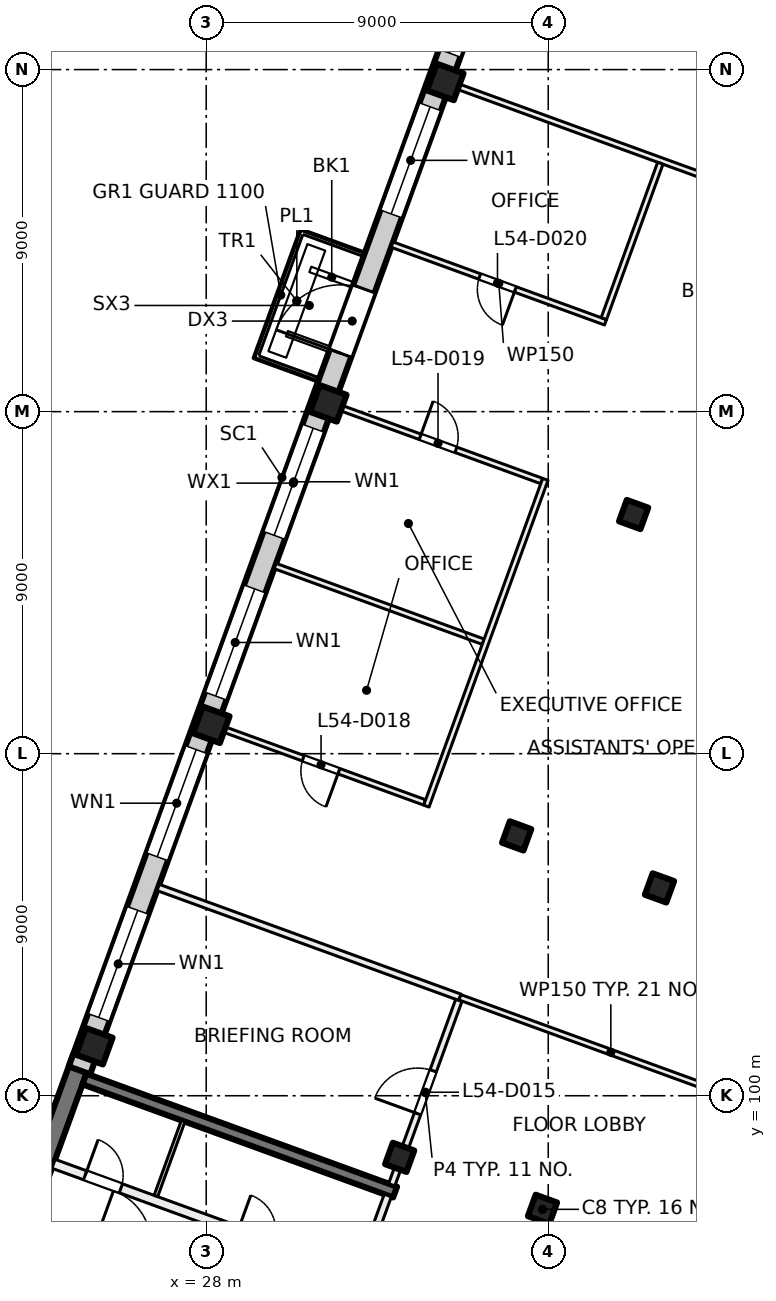
"""IFC4 building model, lengths in metres.
Left out: names, types, materials, properties, quantities, classifications, styles, units other than length and angle.
Written with IfcOpenShell. Run it as: python <this file> out.ifc"""

import sys

from ifc_helpers import new_model, si_unit, direction, frame, frame_2d, origin, origin_2d, place, context, subcontext, project, spatial, rectangle, extrude, element, fill, save


model = new_model("IFC4")
c1 = context("Model", 3, precision=1e-05, world=origin(), true_north=direction((0.0, 1.0)))
c2 = subcontext(c1, "Body", "Model", "MODEL_VIEW")
j1 = project(units=[si_unit("LENGTHUNIT", "METRE"), si_unit("PLANEANGLEUNIT", "RADIAN")], contexts=[c1])
p1 = place(None, origin())
s1 = spatial("IfcSite", under=j1, at=p1, CompositionType="ELEMENT")
p2 = place(p1, origin())
s2 = spatial("IfcBuilding", under=s1, at=p2, CompositionType="ELEMENT")
p3 = place(p2, frame((0.0, 0.0, 228.0)))
s3 = spatial("IfcBuildingStorey", under=s2, at=p3, CompositionType="ELEMENT", Elevation=228.0)
for number, where, z_axis, x_axis in (
    (1, (39.927, 105.468, 0.0), (0.0, 0.0, 1.0), (-0.342, -0.94, 0.0)),
    (2, (36.849, 97.011, 0.0), (0.0, 0.0, 1.0), (-0.342, -0.94, 0.0)),
    (3, (39.247, 115.293, 0.0), (0.0, 0.0, 1.0), (-0.342, -0.94, 0.0)),
    (4, (36.169, 106.836, 0.0), (0.0, 0.0, 1.0), (-0.342, -0.94, 0.0)),
    (5, (33.091, 98.379, 0.0), (0.0, 0.0, 1.0), (-0.342, -0.94, 0.0)),
):
    element("IfcColumn", number, at=place(p3, frame(where, z_axis=z_axis, x_axis=x_axis)), inside=s3, PredefinedType="COLUMN", context=c2, shape_type="SweptSolid", body=[
        extrude(rectangle(XDim=0.6, YDim=0.6, at=origin_2d()), origin(), (0.0, 0.0, 1.0), 4.0),
    ])
for number, where, z_axis, x_axis in (
    (6, (34.291, 126.675, 0.0), (0.0, 0.0, 1.0), (-0.342, -0.94, 0.0)),
    (7, (31.212, 118.218, 0.0), (0.0, 0.0, 1.0), (-0.342, -0.94, 0.0)),
    (8, (28.134, 109.76, 0.0), (0.0, 0.0, 1.0), (-0.342, -0.94, 0.0)),
    (9, (25.056, 101.303, 0.0), (0.0, 0.0, 1.0), (-0.342, -0.94, 0.0)),
):
    element("IfcColumn", number, at=place(p3, frame(where, z_axis=z_axis, x_axis=x_axis)), inside=s3, PredefinedType="COLUMN", context=c2, shape_type="SweptSolid", body=[
        extrude(rectangle(XDim=0.75, YDim=0.75, at=origin_2d()), origin(), (0.0, 0.0, 1.0), 4.0),
    ])
p4 = place(p3, frame((21.67, 92.585, 0.0), z_axis=(0.0, 0.0, 1.0), x_axis=(0.342035714298, 0.93968695327, 0.0)))
e10 = element("IfcWall", 10, at=p4, inside=s3, PredefinedType="SHEAR", context=c2, shape_type="SweptSolid", body=[
    extrude(rectangle(XDim=8.975, YDim=0.5, at=frame_2d((4.488, 0.0))), origin(), (0.0, 0.0, 1.0), 4.0),
])
p5 = place(p3, frame((32.971, 97.465, 0.0), z_axis=(0.0, 0.0, 1.0), x_axis=(-0.939695066972, 0.34201342241, 0.0)))
e11 = element("IfcWall", 11, at=p5, inside=s3, PredefinedType="SHEAR", context=c2, shape_type="SweptSolid", body=[
    extrude(rectangle(XDim=8.7, YDim=0.3, at=frame_2d((4.35, 0.0))), origin(), (0.0, 0.0, 1.0), 4.0),
])
p6 = place(p3, frame((24.666, 100.669, 0.0), z_axis=(0.0, 0.0, 1.0), x_axis=(0.34201964167, 0.939692803373, 0.0)))
e12 = element("IfcWall", 12, at=p6, inside=s3, PredefinedType="SOLIDWALL", context=c2, shape_type="SweptSolid", body=[
    extrude(rectangle(XDim=32.884, YDim=0.6, at=frame_2d((16.442, 0.0))), origin(), (0.0, 0.0, 1.0), 3.625),
])
p7 = place(p6, frame((1.48, 0.0, 0.9)))
e13 = element("IfcOpeningElement", 13, at=p7, cuts=e12, PredefinedType="OPENING", context=c2, shape_type="SweptSolid", body=[
    extrude(rectangle(XDim=3.0, YDim=2.4, at=frame_2d((1.5, 1.2))), frame((0.0, 0.31, 0.0), z_axis=(0.0, -1.0, 0.0), x_axis=(1.0, 0.0, 0.0)), (0.0, 0.0, 1.0), 0.62),
])
p8 = place(p6, frame((5.98, 0.0, 0.9)))
e14 = element("IfcOpeningElement", 14, at=p8, cuts=e12, PredefinedType="OPENING", context=c2, shape_type="SweptSolid", body=[
    extrude(rectangle(XDim=3.0, YDim=2.4, at=frame_2d((1.5, 1.2))), frame((0.0, 0.31, 0.0), z_axis=(0.0, -1.0, 0.0), x_axis=(1.0, 0.0, 0.0)), (0.0, 0.0, 1.0), 0.62),
])
p9 = place(p6, frame((10.48, 0.0, 0.9)))
e15 = element("IfcOpeningElement", 15, at=p9, cuts=e12, PredefinedType="OPENING", context=c2, shape_type="SweptSolid", body=[
    extrude(rectangle(XDim=3.0, YDim=2.4, at=frame_2d((1.5, 1.2))), frame((0.0, 0.31, 0.0), z_axis=(0.0, -1.0, 0.0), x_axis=(1.0, 0.0, 0.0)), (0.0, 0.0, 1.0), 0.62),
])
p10 = place(p6, frame((14.98, 0.0, 0.9)))
e16 = element("IfcOpeningElement", 16, at=p10, cuts=e12, PredefinedType="OPENING", context=c2, shape_type="SweptSolid", body=[
    extrude(rectangle(XDim=3.0, YDim=2.4, at=frame_2d((1.5, 1.2))), frame((0.0, 0.31, 0.0), z_axis=(0.0, -1.0, 0.0), x_axis=(1.0, 0.0, 0.0)), (0.0, 0.0, 1.0), 0.62),
])
p11 = place(p6, frame((20.08, 0.0, 0.0)))
e17 = element("IfcOpeningElement", 17, at=p11, cuts=e12, PredefinedType="OPENING", context=c2, shape_type="SweptSolid", body=[
    extrude(rectangle(XDim=1.8, YDim=2.4, at=frame_2d((0.9, 1.2))), frame((0.0, 0.31, 0.0), z_axis=(0.0, -1.0, 0.0), x_axis=(1.0, 0.0, 0.0)), (0.0, 0.0, 1.0), 0.62),
])
p12 = place(p6, frame((23.98, 0.0, 0.9)))
e18 = element("IfcOpeningElement", 18, at=p12, cuts=e12, PredefinedType="OPENING", context=c2, shape_type="SweptSolid", body=[
    extrude(rectangle(XDim=3.0, YDim=2.4, at=frame_2d((1.5, 1.2))), frame((0.0, 0.31, 0.0), z_axis=(0.0, -1.0, 0.0), x_axis=(1.0, 0.0, 0.0)), (0.0, 0.0, 1.0), 0.62),
])
p13 = place(p6, frame((28.48, 0.0, 0.9)))
e19 = element("IfcOpeningElement", 19, at=p13, cuts=e12, PredefinedType="OPENING", context=c2, shape_type="SweptSolid", body=[
    extrude(rectangle(XDim=3.0, YDim=2.4, at=frame_2d((1.5, 1.2))), frame((0.0, 0.31, 0.0), z_axis=(0.0, -1.0, 0.0), x_axis=(1.0, 0.0, 0.0)), (0.0, 0.0, 1.0), 0.62),
])
p14 = place(p3, frame((31.427, 93.663, 0.0), z_axis=(0.0, 0.0, 1.0), x_axis=(0.342030870568, 0.93968871632, 0.0)))
e20 = element("IfcWall", 20, at=p14, inside=s3, PredefinedType="PARTITIONING", context=c2, shape_type="SweptSolid", body=[
    extrude(rectangle(XDim=3.95, YDim=0.2, at=frame_2d((1.975, 0.0))), origin(), (0.0, 0.0, 1.0), 3.625),
])
p15 = place(p14, frame((0.3, 0.0, 0.0)))
e21 = element("IfcOpeningElement", 21, at=p15, cuts=e20, PredefinedType="OPENING", context=c2, shape_type="SweptSolid", body=[
    extrude(rectangle(XDim=1.2, YDim=2.1, at=frame_2d((0.6, 1.05))), frame((0.0, 0.11, 0.0), z_axis=(0.0, -1.0, 0.0), x_axis=(1.0, 0.0, 0.0)), (0.0, 0.0, 1.0), 0.22),
])
p16 = place(p3, frame((23.427, 96.682, 0.0), z_axis=(0.0, 0.0, 1.0), x_axis=(0.939690465531, -0.342026064782, 0.0)))
e22 = element("IfcWall", 22, at=p16, inside=s3, PredefinedType="PARTITIONING", context=c2, shape_type="SweptSolid", body=[
    extrude(rectangle(XDim=8.45, YDim=0.2, at=frame_2d((4.225, 0.0))), origin(), (0.0, 0.0, 1.0), 3.625),
])
p17 = place(p16, frame((1.725, 0.0, 0.0)))
e23 = element("IfcOpeningElement", 23, at=p17, cuts=e22, PredefinedType="OPENING", context=c2, shape_type="SweptSolid", body=[
    extrude(rectangle(XDim=1.5, YDim=2.1, at=frame_2d((0.75, 1.05))), frame((0.0, 0.11, 0.0), z_axis=(0.0, -1.0, 0.0), x_axis=(1.0, 0.0, 0.0)), (0.0, 0.0, 1.0), 0.22),
])
p18 = place(p3, frame((23.983, 98.208, 0.0), z_axis=(0.0, 0.0, 1.0), x_axis=(0.939699751196, -0.342000552051, 0.0)))
e24 = element("IfcWall", 24, at=p18, inside=s3, PredefinedType="PARTITIONING", context=c2, shape_type="SweptSolid", body=[
    extrude(rectangle(XDim=8.45, YDim=0.25, at=frame_2d((4.225, 0.0))), origin(), (0.0, 0.0, 1.0), 3.625),
])
p19 = place(p18, frame((5.16, 0.0, 0.0)))
e25 = element("IfcOpeningElement", 25, at=p19, cuts=e24, PredefinedType="OPENING", context=c2, shape_type="SweptSolid", body=[
    extrude(rectangle(XDim=1.0, YDim=2.1, at=frame_2d((0.5, 1.05))), frame((0.0, 0.135, 0.0), z_axis=(0.0, -1.0, 0.0), x_axis=(1.0, 0.0, 0.0)), (0.0, 0.0, 1.0), 0.27),
])
p20 = place(p18, frame((0.885, 0.0, 0.0)))
e26 = element("IfcOpeningElement", 26, at=p20, cuts=e24, PredefinedType="OPENING", context=c2, shape_type="SweptSolid", body=[
    extrude(rectangle(XDim=1.0, YDim=2.1, at=frame_2d((0.5, 1.05))), frame((0.0, 0.135, 0.0), z_axis=(0.0, -1.0, 0.0), x_axis=(1.0, 0.0, 0.0)), (0.0, 0.0, 1.0), 0.27),
])
p21 = place(p3, frame((26.676, 97.362, 0.0), z_axis=(0.0, 0.0, 1.0), x_axis=(0.342023078919, 0.939691552312, 0.0)))
e27 = element("IfcWall", 27, at=p21, inside=s3, PredefinedType="PARTITIONING", context=c2, shape_type="SweptSolid", body=[
    extrude(rectangle(XDim=2.1, YDim=0.1, at=frame_2d((1.05, 0.0))), origin(), (0.0, 0.0, 1.0), 3.625),
])
p22 = place(p3, frame((26.736, 105.48, 0.0), z_axis=(0.0, 0.0, 1.0), x_axis=(0.939706509432, -0.341981982173, 0.0)))
e28 = element("IfcWall", 28, at=p22, inside=s3, PredefinedType="PARTITIONING", context=c2, shape_type="SweptSolid", body=[
    extrude(rectangle(XDim=8.45, YDim=0.175, at=frame_2d((4.225, 0.0))), origin(), (0.0, 0.0, 1.0), 3.625),
])
p23 = place(p3, frame((29.814, 113.938, 0.0), z_axis=(0.0, 0.0, 1.0), x_axis=(0.939738354986, -0.341894463495, 0.0)))
e29 = element("IfcWall", 29, at=p23, inside=s3, PredefinedType="PARTITIONING", context=c2, shape_type="SweptSolid", body=[
    extrude(rectangle(XDim=5.826, YDim=0.15, at=frame_2d((2.913, 0.0))), origin(), (0.0, 0.0, 1.0), 3.625),
])
p24 = place(p3, frame((31.353, 118.166, 0.0), z_axis=(0.0, 0.0, 1.0), x_axis=(0.939733456466, -0.341907927371, 0.0)))
e30 = element("IfcWall", 30, at=p24, inside=s3, PredefinedType="PARTITIONING", context=c2, shape_type="SweptSolid", body=[
    extrude(rectangle(XDim=5.826, YDim=0.15, at=frame_2d((2.913, 0.0))), origin(), (0.0, 0.0, 1.0), 3.625),
])
p25 = place(p24, frame((2.423, 0.0, 0.0)))
e31 = element("IfcOpeningElement", 31, at=p25, cuts=e30, PredefinedType="OPENING", context=c2, shape_type="SweptSolid", body=[
    extrude(rectangle(XDim=1.0, YDim=2.1, at=frame_2d((0.5, 1.05))), frame((0.0, 0.085, 0.0), z_axis=(0.0, -1.0, 0.0), x_axis=(1.0, 0.0, 0.0)), (0.0, 0.0, 1.0), 0.17),
])
p26 = place(p3, frame((33.749, 107.717, 0.0), z_axis=(0.0, 0.0, 1.0), x_axis=(-0.939718757431, 0.341948324943, 0.0)))
e32 = element("IfcWall", 32, at=p26, inside=s3, PredefinedType="PARTITIONING", context=c2, shape_type="SweptSolid", body=[
    extrude(rectangle(XDim=5.825, YDim=0.15, at=frame_2d((2.913, 0.0))), origin(), (0.0, 0.0, 1.0), 3.625),
])
p27 = place(p26, frame((2.403, 0.0, 0.0)))
e33 = element("IfcOpeningElement", 33, at=p27, cuts=e32, PredefinedType="OPENING", context=c2, shape_type="SweptSolid", body=[
    extrude(rectangle(XDim=1.0, YDim=2.1, at=frame_2d((0.5, 1.05))), frame((0.0, 0.085, 0.0), z_axis=(0.0, -1.0, 0.0), x_axis=(1.0, 0.0, 0.0)), (0.0, 0.0, 1.0), 0.17),
])
p28 = place(p3, frame((36.924, 116.218, 0.0), z_axis=(0.0, 0.0, 1.0), x_axis=(-0.342220796767, -0.939619564643, 0.0)))
e34 = element("IfcWall", 34, at=p28, inside=s3, PredefinedType="PARTITIONING", context=c2, shape_type="SweptSolid", body=[
    extrude(rectangle(XDim=9.149, YDim=0.15, at=frame_2d((4.575, 0.0))), origin(), (0.0, 0.0, 1.0), 3.625),
])
p29 = place(p3, frame((34.431, 126.624, 0.0), z_axis=(0.0, 0.0, 1.0), x_axis=(0.939703144457, -0.341991228392, 0.0)))
e35 = element("IfcWall", 35, at=p29, inside=s3, PredefinedType="PARTITIONING", context=c2, shape_type="SweptSolid", body=[
    extrude(rectangle(XDim=12.401, YDim=0.15, at=frame_2d((6.2, 0.0))), origin(), (0.0, 0.0, 1.0), 3.625),
])
p30 = place(p3, frame((32.881, 97.657, 0.0), z_axis=(0.0, 0.0, 1.0), x_axis=(0.342058204353, 0.939678766832, 0.0)))
e36 = element("IfcWall", 36, at=p30, inside=s3, PredefinedType="PARTITIONING", context=c2, shape_type="SweptSolid", body=[
    extrude(rectangle(XDim=5.163, YDim=0.175, at=frame_2d((2.581, 0.0))), origin(), (0.0, 0.0, 1.0), 3.625),
])
p31 = place(p30, frame((1.991, 0.0, 0.0)))
e37 = element("IfcOpeningElement", 37, at=p31, cuts=e36, PredefinedType="OPENING", context=c2, shape_type="SweptSolid", body=[
    extrude(rectangle(XDim=1.2, YDim=2.1, at=frame_2d((0.6, 1.05))), frame((0.0, 0.097, 0.0), z_axis=(0.0, -1.0, 0.0), x_axis=(1.0, 0.0, 0.0)), (0.0, 0.0, 1.0), 0.195),
])
p32 = place(p3, frame((34.677, 102.59, 0.0), z_axis=(0.0, 0.0, 1.0), x_axis=(0.939683705252, -0.342044637561, 0.0)))
e38 = element("IfcWall", 38, at=p32, inside=s3, PredefinedType="PARTITIONING", context=c2, shape_type="SweptSolid", body=[
    extrude(rectangle(XDim=8.45, YDim=0.15, at=frame_2d((4.225, 0.0))), origin(), (0.0, 0.0, 1.0), 3.625),
])
p33 = place(p3, frame((38.507, 120.351, 0.0), z_axis=(0.0, 0.0, 1.0), x_axis=(-0.939678850769, 0.342057973766, 0.0)))
e39 = element("IfcWall", 39, at=p33, inside=s3, PredefinedType="PARTITIONING", context=c2, shape_type="SweptSolid", body=[
    extrude(rectangle(XDim=5.975, YDim=0.15, at=frame_2d((2.988, 0.0))), origin(), (0.0, 0.0, 1.0), 3.625),
])
p34 = place(p33, frame((2.525, 0.0, 0.0)))
e40 = element("IfcOpeningElement", 40, at=p34, cuts=e39, PredefinedType="OPENING", context=c2, shape_type="SweptSolid", body=[
    extrude(rectangle(XDim=1.0, YDim=2.1, at=frame_2d((0.5, 1.05))), frame((0.0, 0.085, 0.0), z_axis=(0.0, -1.0, 0.0), x_axis=(1.0, 0.0, 0.0)), (0.0, 0.0, 1.0), 0.17),
])
p35 = place(p3, frame((39.95, 124.536, 0.0), z_axis=(0.0, 0.0, 1.0), x_axis=(-0.341783611499, -0.939778677621, 0.0)))
e41 = element("IfcWall", 41, at=p35, inside=s3, PredefinedType="PARTITIONING", context=c2, shape_type="SweptSolid", body=[
    extrude(rectangle(XDim=4.351, YDim=0.15, at=frame_2d((2.175, 0.0))), origin(), (0.0, 0.0, 1.0), 3.625),
])
p36 = place(p7, origin())
e42 = element("IfcWindow", 42, at=p36, inside=s3, PartitioningType="SINGLE_PANEL", PredefinedType="WINDOW", context=c2, shape_type="SweptSolid", body=[
    extrude(rectangle(XDim=3.0, YDim=2.4, at=frame_2d((1.5, 1.2))), frame((0.0, 0.03, 0.0), z_axis=(0.0, -1.0, 0.0), x_axis=(1.0, 0.0, 0.0)), (0.0, 0.0, 1.0), 0.06),
])
fill(e13, e42)
p37 = place(p8, origin())
e43 = element("IfcWindow", 43, at=p37, inside=s3, PartitioningType="SINGLE_PANEL", PredefinedType="WINDOW", context=c2, shape_type="SweptSolid", body=[
    extrude(rectangle(XDim=3.0, YDim=2.4, at=frame_2d((1.5, 1.2))), frame((0.0, 0.03, 0.0), z_axis=(0.0, -1.0, 0.0), x_axis=(1.0, 0.0, 0.0)), (0.0, 0.0, 1.0), 0.06),
])
fill(e14, e43)
p38 = place(p9, origin())
e44 = element("IfcWindow", 44, at=p38, inside=s3, PartitioningType="SINGLE_PANEL", PredefinedType="WINDOW", context=c2, shape_type="SweptSolid", body=[
    extrude(rectangle(XDim=3.0, YDim=2.4, at=frame_2d((1.5, 1.2))), frame((0.0, 0.03, 0.0), z_axis=(0.0, -1.0, 0.0), x_axis=(1.0, 0.0, 0.0)), (0.0, 0.0, 1.0), 0.06),
])
fill(e15, e44)
p39 = place(p10, origin())
e45 = element("IfcWindow", 45, at=p39, inside=s3, PartitioningType="SINGLE_PANEL", PredefinedType="WINDOW", context=c2, shape_type="SweptSolid", body=[
    extrude(rectangle(XDim=3.0, YDim=2.4, at=frame_2d((1.5, 1.2))), frame((0.0, 0.03, 0.0), z_axis=(0.0, -1.0, 0.0), x_axis=(1.0, 0.0, 0.0)), (0.0, 0.0, 1.0), 0.06),
])
fill(e16, e45)
p40 = place(p11, origin())
e46 = element("IfcDoor", 46, at=p40, inside=s3, OperationType="DOUBLE_DOOR_SINGLE_SWING", PredefinedType="DOOR", context=c2, shape_type="SweptSolid", body=[
    extrude(rectangle(XDim=1.8, YDim=2.4, at=frame_2d((0.9, 1.2))), frame((0.0, 0.025, 0.0), z_axis=(0.0, -1.0, 0.0), x_axis=(1.0, 0.0, 0.0)), (0.0, 0.0, 1.0), 0.05),
])
fill(e17, e46)
p41 = place(p12, origin())
e47 = element("IfcWindow", 47, at=p41, inside=s3, PartitioningType="SINGLE_PANEL", PredefinedType="WINDOW", context=c2, shape_type="SweptSolid", body=[
    extrude(rectangle(XDim=3.0, YDim=2.4, at=frame_2d((1.5, 1.2))), frame((0.0, 0.03, 0.0), z_axis=(0.0, -1.0, 0.0), x_axis=(1.0, 0.0, 0.0)), (0.0, 0.0, 1.0), 0.06),
])
fill(e18, e47)
p42 = place(p13, origin())
e48 = element("IfcWindow", 48, at=p42, inside=s3, PartitioningType="SINGLE_PANEL", PredefinedType="WINDOW", context=c2, shape_type="SweptSolid", body=[
    extrude(rectangle(XDim=3.0, YDim=2.4, at=frame_2d((1.5, 1.2))), frame((0.0, 0.03, 0.0), z_axis=(0.0, -1.0, 0.0), x_axis=(1.0, 0.0, 0.0)), (0.0, 0.0, 1.0), 0.06),
])
fill(e19, e48)
p43 = place(p20, origin())
e49 = element("IfcDoor", 49, at=p43, inside=s3, OperationType="SINGLE_SWING_RIGHT", PredefinedType="DOOR", context=c2, shape_type="SweptSolid", body=[
    extrude(rectangle(XDim=1.0, YDim=2.1, at=frame_2d((0.5, 1.05))), frame((0.0, 0.025, 0.0), z_axis=(0.0, -1.0, 0.0), x_axis=(1.0, 0.0, 0.0)), (0.0, 0.0, 1.0), 0.05),
])
fill(e26, e49)
p44 = place(p31, origin())
e50 = element("IfcDoor", 50, at=p44, inside=s3, OperationType="DOUBLE_DOOR_SINGLE_SWING", PredefinedType="DOOR", context=c2, shape_type="SweptSolid", body=[
    extrude(rectangle(XDim=1.2, YDim=2.1, at=frame_2d((0.6, 1.05))), frame((0.0, 0.025, 0.0), z_axis=(0.0, -1.0, 0.0), x_axis=(1.0, 0.0, 0.0)), (0.0, 0.0, 1.0), 0.05),
])
fill(e37, e50)
p45 = place(p27, origin())
e51 = element("IfcDoor", 51, at=p45, inside=s3, OperationType="SINGLE_SWING_LEFT", PredefinedType="DOOR", context=c2, shape_type="SweptSolid", body=[
    extrude(rectangle(XDim=1.0, YDim=2.1, at=frame_2d((0.5, 1.05))), frame((0.0, 0.025, 0.0), z_axis=(0.0, -1.0, 0.0), x_axis=(1.0, 0.0, 0.0)), (0.0, 0.0, 1.0), 0.05),
])
fill(e33, e51)
p46 = place(p25, origin())
e52 = element("IfcDoor", 52, at=p46, inside=s3, OperationType="SINGLE_SWING_LEFT", PredefinedType="DOOR", context=c2, shape_type="SweptSolid", body=[
    extrude(rectangle(XDim=1.0, YDim=2.1, at=frame_2d((0.5, 1.05))), frame((0.0, 0.025, 0.0), z_axis=(0.0, -1.0, 0.0), x_axis=(1.0, 0.0, 0.0)), (0.0, 0.0, 1.0), 0.05),
])
fill(e31, e52)
p47 = place(p34, origin())
e53 = element("IfcDoor", 53, at=p47, inside=s3, OperationType="SINGLE_SWING_LEFT", PredefinedType="DOOR", context=c2, shape_type="SweptSolid", body=[
    extrude(rectangle(XDim=1.0, YDim=2.1, at=frame_2d((0.5, 1.05))), frame((0.0, 0.025, 0.0), z_axis=(0.0, -1.0, 0.0), x_axis=(1.0, 0.0, 0.0)), (0.0, 0.0, 1.0), 0.05),
])
fill(e40, e53)
save(model, sys.argv[1])
